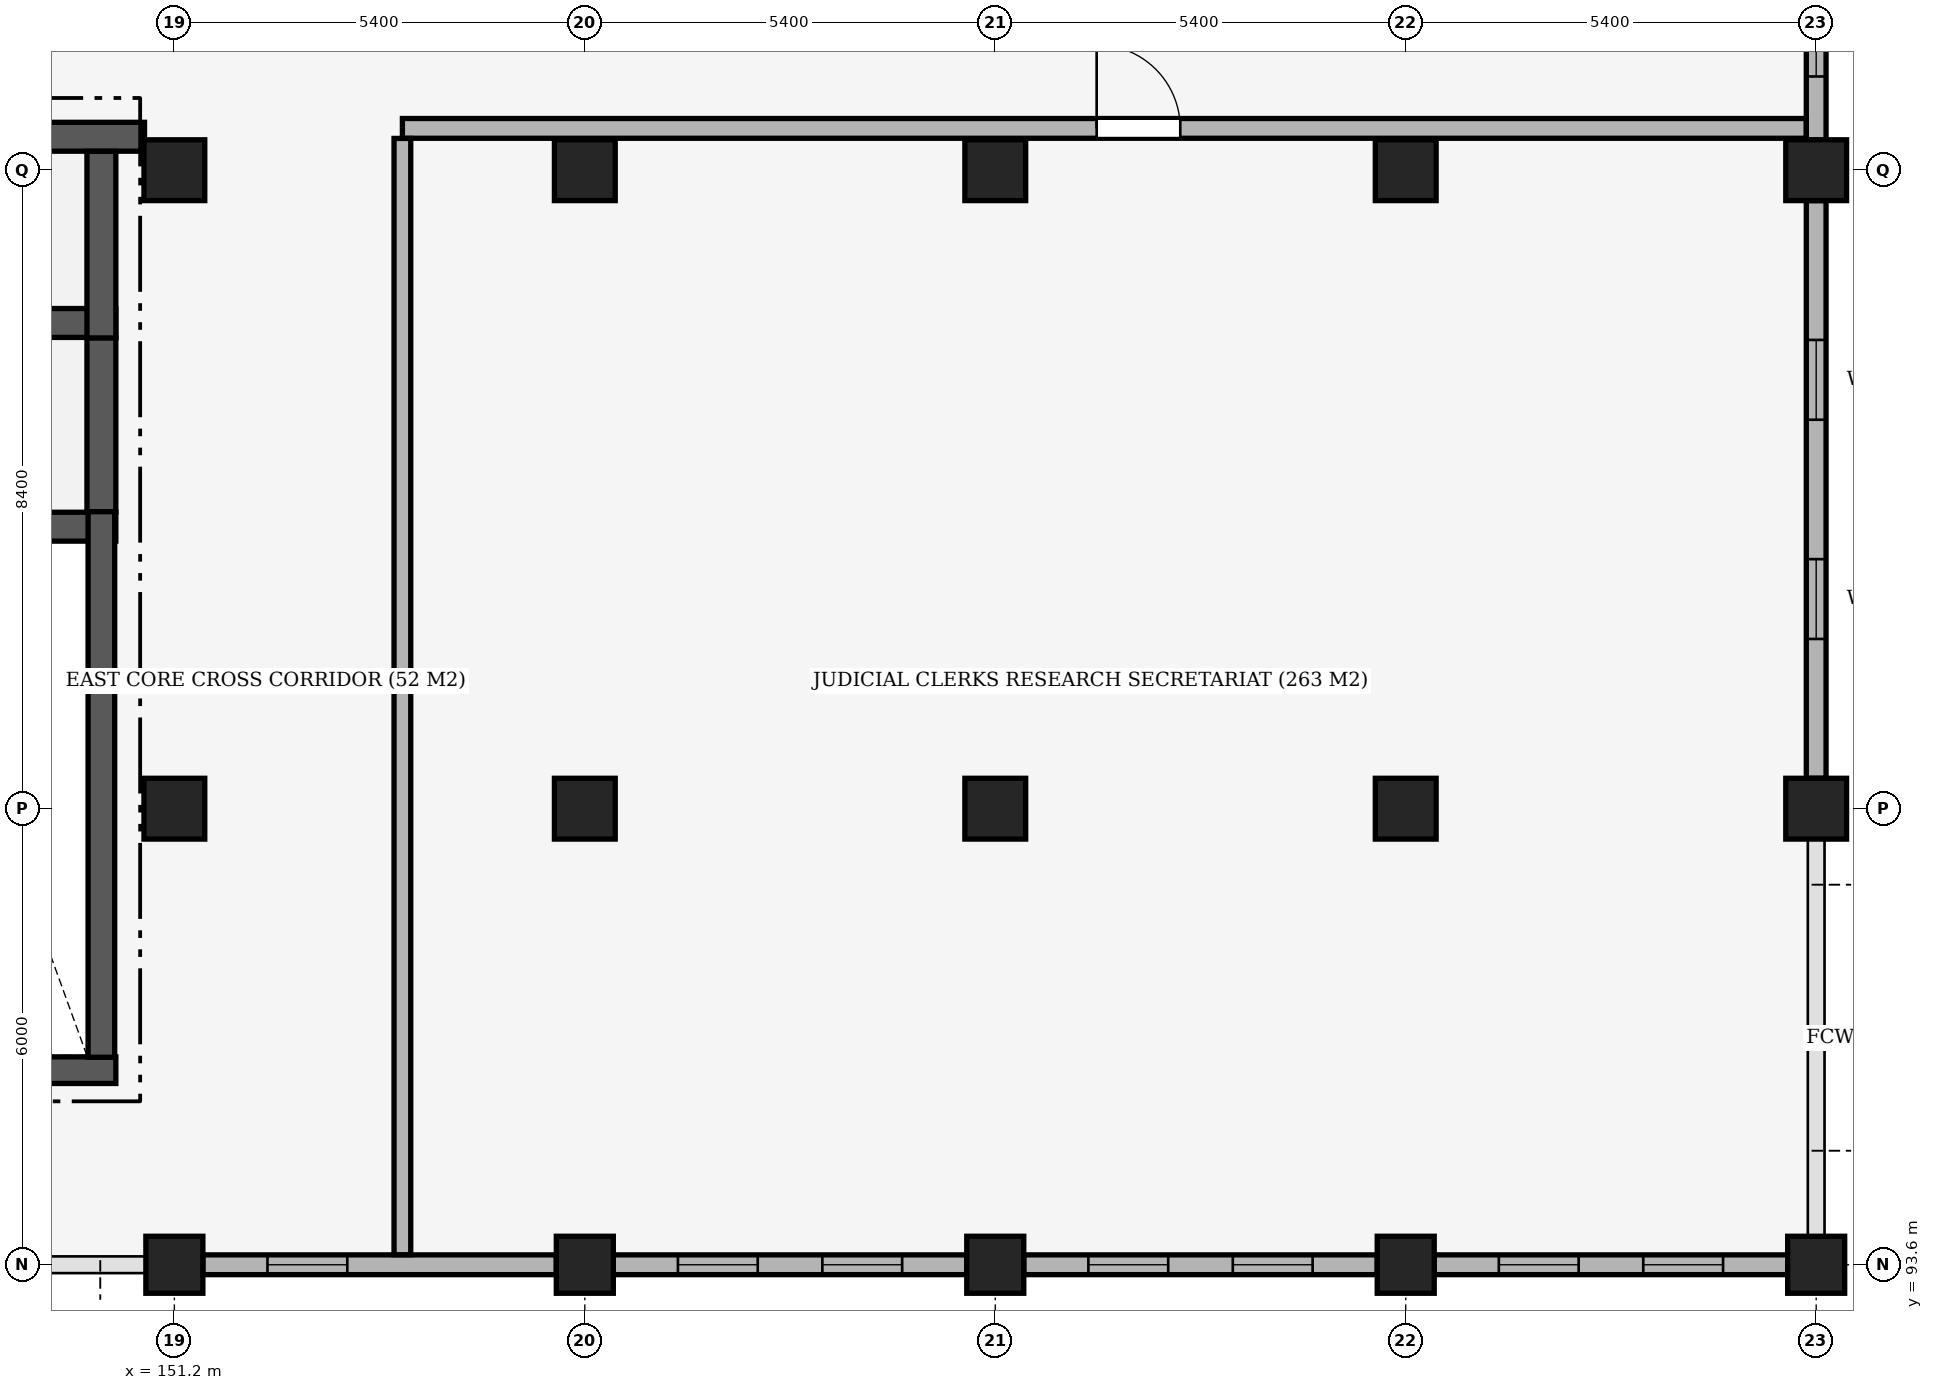
"""IFC4 building model, lengths in metres.
Left out: names, types, materials, properties, quantities, classifications, styles, units other than length and angle.
Written with IfcOpenShell. Run it as: python <this file> out.ifc"""

import sys

from ifc_helpers import new_model, si_unit, direction, frame, frame_2d, origin, origin_2d, place, context, subcontext, project, spatial, rectangle, extrude, element, fill, save


model = new_model("IFC4")
c1 = context("Model", 3, precision=1e-05, world=origin(), true_north=direction((0.0, 1.0)))
c2 = subcontext(c1, "Body", "Model", "MODEL_VIEW")
j1 = project(units=[si_unit("LENGTHUNIT", "METRE"), si_unit("PLANEANGLEUNIT", "RADIAN")], contexts=[c1])
p1 = place(None, origin())
s1 = spatial("IfcSite", under=j1, at=p1, CompositionType="ELEMENT")
p2 = place(p1, origin())
s2 = spatial("IfcBuilding", under=s1, at=p2, CompositionType="ELEMENT")
p3 = place(p2, frame((0.0, 0.0, 20.4)))
s3 = spatial("IfcBuildingStorey", under=s2, at=p3, CompositionType="ELEMENT", Elevation=20.4)
p4 = place(p3, frame((151.2, 93.6, 0.0), z_axis=(0.0, 0.0, 1.0), x_axis=(1.0, 0.0, 0.0)))
e1 = element("IfcColumn", 1, at=p4, inside=s3, PredefinedType="COLUMN", context=c2, shape_type="SweptSolid", body=[
    extrude(rectangle(XDim=0.75, YDim=0.75, at=origin_2d()), origin(), (0.0, 0.0, 1.0), 4.8),
])
for number, where, z_axis, x_axis in (
    (2, (151.2, 99.6, 0.0), (0.0, 0.0, 1.0), (1.0, 0.0, 0.0)),
    (3, (151.2, 108.0, 0.0), (0.0, 0.0, 1.0), (1.0, 0.0, 0.0)),
):
    element("IfcColumn", number, at=place(p3, frame(where, z_axis=z_axis, x_axis=x_axis)), inside=s3, PredefinedType="COLUMN", context=c2, shape_type="SweptSolid", body=[
        extrude(rectangle(XDim=0.8, YDim=0.8, at=origin_2d()), origin(), (0.0, 0.0, 1.0), 4.8),
    ])
p5 = place(p3, frame((156.6, 93.6, 0.0), z_axis=(0.0, 0.0, 1.0), x_axis=(1.0, 0.0, 0.0)))
e4 = element("IfcColumn", 4, at=p5, inside=s3, PredefinedType="COLUMN", context=c2, shape_type="SweptSolid", body=[
    extrude(rectangle(XDim=0.75, YDim=0.75, at=origin_2d()), origin(), (0.0, 0.0, 1.0), 4.8),
])
for number, where, z_axis, x_axis in (
    (5, (156.6, 99.6, 0.0), (0.0, 0.0, 1.0), (1.0, 0.0, 0.0)),
    (6, (156.6, 108.0, 0.0), (0.0, 0.0, 1.0), (1.0, 0.0, 0.0)),
):
    element("IfcColumn", number, at=place(p3, frame(where, z_axis=z_axis, x_axis=x_axis)), inside=s3, PredefinedType="COLUMN", context=c2, shape_type="SweptSolid", body=[
        extrude(rectangle(XDim=0.8, YDim=0.8, at=origin_2d()), origin(), (0.0, 0.0, 1.0), 4.8),
    ])
p6 = place(p3, frame((162.0, 93.6, 0.0), z_axis=(0.0, 0.0, 1.0), x_axis=(1.0, 0.0, 0.0)))
e7 = element("IfcColumn", 7, at=p6, inside=s3, PredefinedType="COLUMN", context=c2, shape_type="SweptSolid", body=[
    extrude(rectangle(XDim=0.75, YDim=0.75, at=origin_2d()), origin(), (0.0, 0.0, 1.0), 4.8),
])
for number, where, z_axis, x_axis in (
    (8, (162.0, 99.6, 0.0), (0.0, 0.0, 1.0), (1.0, 0.0, 0.0)),
    (9, (162.0, 108.0, 0.0), (0.0, 0.0, 1.0), (1.0, 0.0, 0.0)),
):
    element("IfcColumn", number, at=place(p3, frame(where, z_axis=z_axis, x_axis=x_axis)), inside=s3, PredefinedType="COLUMN", context=c2, shape_type="SweptSolid", body=[
        extrude(rectangle(XDim=0.8, YDim=0.8, at=origin_2d()), origin(), (0.0, 0.0, 1.0), 4.8),
    ])
p7 = place(p3, frame((167.4, 93.6, 0.0), z_axis=(0.0, 0.0, 1.0), x_axis=(1.0, 0.0, 0.0)))
e10 = element("IfcColumn", 10, at=p7, inside=s3, PredefinedType="COLUMN", context=c2, shape_type="SweptSolid", body=[
    extrude(rectangle(XDim=0.75, YDim=0.75, at=origin_2d()), origin(), (0.0, 0.0, 1.0), 4.8),
])
for number, where, z_axis, x_axis in (
    (11, (167.4, 99.6, 0.0), (0.0, 0.0, 1.0), (1.0, 0.0, 0.0)),
    (12, (167.4, 108.0, 0.0), (0.0, 0.0, 1.0), (1.0, 0.0, 0.0)),
):
    element("IfcColumn", number, at=place(p3, frame(where, z_axis=z_axis, x_axis=x_axis)), inside=s3, PredefinedType="COLUMN", context=c2, shape_type="SweptSolid", body=[
        extrude(rectangle(XDim=0.8, YDim=0.8, at=origin_2d()), origin(), (0.0, 0.0, 1.0), 4.8),
    ])
p8 = place(p3, frame((172.8, 93.6, 0.0), z_axis=(0.0, 0.0, 1.0), x_axis=(1.0, 0.0, 0.0)))
e13 = element("IfcColumn", 13, at=p8, inside=s3, PredefinedType="COLUMN", context=c2, shape_type="SweptSolid", body=[
    extrude(rectangle(XDim=0.75, YDim=0.75, at=origin_2d()), origin(), (0.0, 0.0, 1.0), 4.8),
])
for number, where, z_axis, x_axis in (
    (14, (172.8, 99.6, 0.0), (0.0, 0.0, 1.0), (1.0, 0.0, 0.0)),
    (15, (172.8, 108.0, 0.0), (0.0, 0.0, 1.0), (1.0, 0.0, 0.0)),
):
    element("IfcColumn", number, at=place(p3, frame(where, z_axis=z_axis, x_axis=x_axis)), inside=s3, PredefinedType="COLUMN", context=c2, shape_type="SweptSolid", body=[
        extrude(rectangle(XDim=0.8, YDim=0.8, at=origin_2d()), origin(), (0.0, 0.0, 1.0), 4.8),
    ])
p9 = place(p3, frame((172.8, 113.0, 0.0), z_axis=(0.0, 0.0, 1.0), x_axis=(0.0, -1.0, 0.0)))
e16 = element("IfcWall", 16, at=p9, inside=s3, PredefinedType="SOLIDWALL", context=c2, shape_type="SweptSolid", body=[
    extrude(rectangle(XDim=4.6, YDim=0.26, at=frame_2d((2.3, 0.0))), origin(), (0.0, 0.0, 1.0), 4.0),
])
p10 = place(p9, frame((0.833, 0.0, 1.05)))
e17 = element("IfcOpeningElement", 17, at=p10, cuts=e16, PredefinedType="OPENING", context=c2, shape_type="SweptSolid", body=[
    extrude(rectangle(XDim=1.05, YDim=1.8, at=frame_2d((0.525, 0.9))), frame((0.0, 0.145, 0.0), z_axis=(0.0, -1.0, 0.0), x_axis=(1.0, 0.0, 0.0)), (0.0, 0.0, 1.0), 0.29),
])
p11 = place(p9, frame((2.717, 0.0, 1.05)))
e18 = element("IfcOpeningElement", 18, at=p11, cuts=e16, PredefinedType="OPENING", context=c2, shape_type="SweptSolid", body=[
    extrude(rectangle(XDim=1.05, YDim=1.8, at=frame_2d((0.525, 0.9))), frame((0.0, 0.145, 0.0), z_axis=(0.0, -1.0, 0.0), x_axis=(1.0, 0.0, 0.0)), (0.0, 0.0, 1.0), 0.29),
])
p12 = place(p3, frame((172.8, 107.6, 0.0), z_axis=(0.0, 0.0, 1.0), x_axis=(0.0, -1.0, 0.0)))
e19 = element("IfcWall", 19, at=p12, inside=s3, PredefinedType="SOLIDWALL", context=c2, shape_type="SweptSolid", body=[
    extrude(rectangle(XDim=7.6, YDim=0.26, at=frame_2d((3.8, 0.0))), origin(), (0.0, 0.0, 1.0), 3.85),
])
p13 = place(p12, frame((1.833, 0.0, 1.05)))
e20 = element("IfcOpeningElement", 20, at=p13, cuts=e19, PredefinedType="OPENING", context=c2, shape_type="SweptSolid", body=[
    extrude(rectangle(XDim=1.05, YDim=1.8, at=frame_2d((0.525, 0.9))), frame((0.0, 0.145, 0.0), z_axis=(0.0, -1.0, 0.0), x_axis=(1.0, 0.0, 0.0)), (0.0, 0.0, 1.0), 0.29),
])
p14 = place(p12, frame((4.717, 0.0, 1.05)))
e21 = element("IfcOpeningElement", 21, at=p14, cuts=e19, PredefinedType="OPENING", context=c2, shape_type="SweptSolid", body=[
    extrude(rectangle(XDim=1.05, YDim=1.8, at=frame_2d((0.525, 0.9))), frame((0.0, 0.145, 0.0), z_axis=(0.0, -1.0, 0.0), x_axis=(1.0, 0.0, 0.0)), (0.0, 0.0, 1.0), 0.29),
])
p15 = place(p3, frame((172.425, 93.6, 0.0), z_axis=(0.0, 0.0, 1.0), x_axis=(-1.0, 0.0, 0.0)))
e22 = element("IfcWall", 22, at=p15, inside=s3, PredefinedType="SOLIDWALL", context=c2, shape_type="SweptSolid", body=[
    extrude(rectangle(XDim=4.65, YDim=0.26, at=frame_2d((2.325, 0.0))), origin(), (0.0, 0.0, 1.0), 3.95),
])
p16 = place(p15, frame((0.85, 0.0, 1.05)))
e23 = element("IfcOpeningElement", 23, at=p16, cuts=e22, PredefinedType="OPENING", context=c2, shape_type="SweptSolid", body=[
    extrude(rectangle(XDim=1.05, YDim=1.8, at=frame_2d((0.525, 0.9))), frame((0.0, 0.145, 0.0), z_axis=(0.0, -1.0, 0.0), x_axis=(1.0, 0.0, 0.0)), (0.0, 0.0, 1.0), 0.29),
])
p17 = place(p15, frame((2.75, 0.0, 1.05)))
e24 = element("IfcOpeningElement", 24, at=p17, cuts=e22, PredefinedType="OPENING", context=c2, shape_type="SweptSolid", body=[
    extrude(rectangle(XDim=1.05, YDim=1.8, at=frame_2d((0.525, 0.9))), frame((0.0, 0.145, 0.0), z_axis=(0.0, -1.0, 0.0), x_axis=(1.0, 0.0, 0.0)), (0.0, 0.0, 1.0), 0.29),
])
p18 = place(p3, frame((167.025, 93.6, 0.0), z_axis=(0.0, 0.0, 1.0), x_axis=(-1.0, 0.0, 0.0)))
e25 = element("IfcWall", 25, at=p18, inside=s3, PredefinedType="SOLIDWALL", context=c2, shape_type="SweptSolid", body=[
    extrude(rectangle(XDim=4.65, YDim=0.26, at=frame_2d((2.325, 0.0))), origin(), (0.0, 0.0, 1.0), 3.95),
])
p19 = place(p18, frame((0.85, 0.0, 1.05)))
e26 = element("IfcOpeningElement", 26, at=p19, cuts=e25, PredefinedType="OPENING", context=c2, shape_type="SweptSolid", body=[
    extrude(rectangle(XDim=1.05, YDim=1.8, at=frame_2d((0.525, 0.9))), frame((0.0, 0.145, 0.0), z_axis=(0.0, -1.0, 0.0), x_axis=(1.0, 0.0, 0.0)), (0.0, 0.0, 1.0), 0.29),
])
p20 = place(p18, frame((2.75, 0.0, 1.05)))
e27 = element("IfcOpeningElement", 27, at=p20, cuts=e25, PredefinedType="OPENING", context=c2, shape_type="SweptSolid", body=[
    extrude(rectangle(XDim=1.05, YDim=1.8, at=frame_2d((0.525, 0.9))), frame((0.0, 0.145, 0.0), z_axis=(0.0, -1.0, 0.0), x_axis=(1.0, 0.0, 0.0)), (0.0, 0.0, 1.0), 0.29),
])
p21 = place(p3, frame((161.625, 93.6, 0.0), z_axis=(0.0, 0.0, 1.0), x_axis=(-1.0, 0.0, 0.0)))
e28 = element("IfcWall", 28, at=p21, inside=s3, PredefinedType="SOLIDWALL", context=c2, shape_type="SweptSolid", body=[
    extrude(rectangle(XDim=4.65, YDim=0.26, at=frame_2d((2.325, 0.0))), origin(), (0.0, 0.0, 1.0), 3.95),
])
p22 = place(p21, frame((0.85, 0.0, 1.05)))
e29 = element("IfcOpeningElement", 29, at=p22, cuts=e28, PredefinedType="OPENING", context=c2, shape_type="SweptSolid", body=[
    extrude(rectangle(XDim=1.05, YDim=1.8, at=frame_2d((0.525, 0.9))), frame((0.0, 0.145, 0.0), z_axis=(0.0, -1.0, 0.0), x_axis=(1.0, 0.0, 0.0)), (0.0, 0.0, 1.0), 0.29),
])
p23 = place(p21, frame((2.75, 0.0, 1.05)))
e30 = element("IfcOpeningElement", 30, at=p23, cuts=e28, PredefinedType="OPENING", context=c2, shape_type="SweptSolid", body=[
    extrude(rectangle(XDim=1.05, YDim=1.8, at=frame_2d((0.525, 0.9))), frame((0.0, 0.145, 0.0), z_axis=(0.0, -1.0, 0.0), x_axis=(1.0, 0.0, 0.0)), (0.0, 0.0, 1.0), 0.29),
])
p24 = place(p3, frame((156.225, 93.6, 0.0), z_axis=(0.0, 0.0, 1.0), x_axis=(-1.0, 0.0, 0.0)))
e31 = element("IfcWall", 31, at=p24, inside=s3, PredefinedType="SOLIDWALL", context=c2, shape_type="SweptSolid", body=[
    extrude(rectangle(XDim=4.65, YDim=0.26, at=frame_2d((2.325, 0.0))), origin(), (0.0, 0.0, 1.0), 3.95),
])
p25 = place(p24, frame((2.75, 0.0, 1.05)))
e32 = element("IfcOpeningElement", 32, at=p25, cuts=e31, PredefinedType="OPENING", context=c2, shape_type="SweptSolid", body=[
    extrude(rectangle(XDim=1.05, YDim=1.8, at=frame_2d((0.525, 0.9))), frame((0.0, 0.145, 0.0), z_axis=(0.0, -1.0, 0.0), x_axis=(1.0, 0.0, 0.0)), (0.0, 0.0, 1.0), 0.29),
])
p26 = place(p3, frame((147.513, 103.31, 0.0), z_axis=(0.0, 0.0, 1.0), x_axis=(1.0, 0.0, 0.0)))
e33 = element("IfcWall", 33, at=p26, inside=s3, PredefinedType="SHEAR", context=c2, shape_type="SweptSolid", body=[
    extrude(rectangle(XDim=2.917, YDim=0.38, at=frame_2d((1.458, 0.0))), origin(), (0.0, 0.0, 1.0), 4.55),
])
p27 = place(p3, frame((147.17, 105.99, 0.0), z_axis=(0.0, 0.0, 1.0), x_axis=(1.0, 0.0, 0.0)))
e34 = element("IfcWall", 34, at=p27, inside=s3, PredefinedType="SHEAR", context=c2, shape_type="SweptSolid", body=[
    extrude(rectangle(XDim=3.26, YDim=0.38, at=frame_2d((1.63, 0.0))), origin(), (0.0, 0.0, 1.0), 4.55),
])
p28 = place(p3, frame((150.24, 103.502, 0.0), z_axis=(0.0, 0.0, 1.0), x_axis=(0.0, 1.0, 0.0)))
e35 = element("IfcWall", 35, at=p28, inside=s3, PredefinedType="SHEAR", context=c2, shape_type="SweptSolid", body=[
    extrude(rectangle(XDim=2.296, YDim=0.38, at=frame_2d((1.148, 0.0))), origin(), (0.0, 0.0, 1.0), 4.55),
])
p29 = place(p3, frame((147.17, 108.44, 0.0), z_axis=(0.0, 0.0, 1.0), x_axis=(1.0, 0.0, 0.0)))
e36 = element("IfcWall", 36, at=p29, inside=s3, PredefinedType="SHEAR", context=c2, shape_type="SweptSolid", body=[
    extrude(rectangle(XDim=3.637, YDim=0.38, at=frame_2d((1.818, 0.0))), origin(), (0.0, 0.0, 1.0), 4.55),
])
p30 = place(p3, frame((150.24, 105.793, 0.0), z_axis=(0.0, 0.0, 1.0), x_axis=(0.0, 1.0, 0.0)))
e37 = element("IfcWall", 37, at=p30, inside=s3, PredefinedType="SHEAR", context=c2, shape_type="SweptSolid", body=[
    extrude(rectangle(XDim=2.455, YDim=0.38, at=frame_2d((1.228, 0.0))), origin(), (0.0, 0.0, 1.0), 4.55),
])
p31 = place(p3, frame((147.58, 96.16, 0.0), z_axis=(0.0, 0.0, 1.0), x_axis=(1.0, 0.0, 0.0)))
e38 = element("IfcWall", 38, at=p31, inside=s3, PredefinedType="SHEAR", context=c2, shape_type="SweptSolid", body=[
    extrude(rectangle(XDim=2.85, YDim=0.35, at=frame_2d((1.425, 0.0))), origin(), (0.0, 0.0, 1.0), 4.55),
])
p32 = place(p3, frame((150.24, 96.33, 0.0), z_axis=(0.0, 0.0, 1.0), x_axis=(0.0, 1.0, 0.0)))
e39 = element("IfcWall", 39, at=p32, inside=s3, PredefinedType="SHEAR", context=c2, shape_type="SweptSolid", body=[
    extrude(rectangle(XDim=7.177, YDim=0.35, at=frame_2d((3.588, 0.0))), origin(), (0.0, 0.0, 1.0), 4.55),
])
p33 = place(p3, frame((154.2, 108.55, 0.0), z_axis=(0.0, 0.0, 1.0), x_axis=(1.0, 0.0, 0.0)))
e40 = element("IfcWall", 40, at=p33, inside=s3, PredefinedType="PARTITIONING", context=c2, shape_type="SweptSolid", body=[
    extrude(rectangle(XDim=18.468, YDim=0.26, at=frame_2d((9.234, 0.0))), origin(), (0.0, 0.0, 1.0), 4.0),
])
p34 = place(p33, frame((9.134, 0.0, 0.0)))
e41 = element("IfcOpeningElement", 41, at=p34, cuts=e40, PredefinedType="OPENING", context=c2, shape_type="SweptSolid", body=[
    extrude(rectangle(XDim=1.1, YDim=2.1, at=frame_2d((0.55, 1.05))), frame((0.0, 0.145, 0.0), z_axis=(0.0, -1.0, 0.0), x_axis=(1.0, 0.0, 0.0)), (0.0, 0.0, 1.0), 0.29),
])
p35 = place(p3, frame((154.2, 93.732, 0.0), z_axis=(0.0, 0.0, 1.0), x_axis=(0.0, 1.0, 0.0)))
e42 = element("IfcWall", 42, at=p35, inside=s3, PredefinedType="PARTITIONING", context=c2, shape_type="SweptSolid", body=[
    extrude(rectangle(XDim=14.686, YDim=0.22, at=frame_2d((7.343, 0.0))), origin(), (0.0, 0.0, 1.0), 3.95),
])
p36 = place(p11, origin())
e43 = element("IfcWindow", 43, at=p36, inside=s3, PartitioningType="SINGLE_PANEL", PredefinedType="WINDOW", context=c2, shape_type="SweptSolid", body=[
    extrude(rectangle(XDim=1.05, YDim=1.8, at=frame_2d((0.525, 0.9))), frame((0.0, 0.03, 0.0), z_axis=(0.0, -1.0, 0.0), x_axis=(1.0, 0.0, 0.0)), (0.0, 0.0, 1.0), 0.06),
])
fill(e18, e43)
p37 = place(p13, origin())
e44 = element("IfcWindow", 44, at=p37, inside=s3, PartitioningType="SINGLE_PANEL", PredefinedType="WINDOW", context=c2, shape_type="SweptSolid", body=[
    extrude(rectangle(XDim=1.05, YDim=1.8, at=frame_2d((0.525, 0.9))), frame((0.0, 0.03, 0.0), z_axis=(0.0, -1.0, 0.0), x_axis=(1.0, 0.0, 0.0)), (0.0, 0.0, 1.0), 0.06),
])
fill(e20, e44)
p38 = place(p14, origin())
e45 = element("IfcWindow", 45, at=p38, inside=s3, PartitioningType="SINGLE_PANEL", PredefinedType="WINDOW", context=c2, shape_type="SweptSolid", body=[
    extrude(rectangle(XDim=1.05, YDim=1.8, at=frame_2d((0.525, 0.9))), frame((0.0, 0.03, 0.0), z_axis=(0.0, -1.0, 0.0), x_axis=(1.0, 0.0, 0.0)), (0.0, 0.0, 1.0), 0.06),
])
fill(e21, e45)
p39 = place(p16, origin())
e46 = element("IfcWindow", 46, at=p39, inside=s3, PartitioningType="SINGLE_PANEL", PredefinedType="WINDOW", context=c2, shape_type="SweptSolid", body=[
    extrude(rectangle(XDim=1.05, YDim=1.8, at=frame_2d((0.525, 0.9))), frame((0.0, 0.03, 0.0), z_axis=(0.0, -1.0, 0.0), x_axis=(1.0, 0.0, 0.0)), (0.0, 0.0, 1.0), 0.06),
])
fill(e23, e46)
p40 = place(p17, origin())
e47 = element("IfcWindow", 47, at=p40, inside=s3, PartitioningType="SINGLE_PANEL", PredefinedType="WINDOW", context=c2, shape_type="SweptSolid", body=[
    extrude(rectangle(XDim=1.05, YDim=1.8, at=frame_2d((0.525, 0.9))), frame((0.0, 0.03, 0.0), z_axis=(0.0, -1.0, 0.0), x_axis=(1.0, 0.0, 0.0)), (0.0, 0.0, 1.0), 0.06),
])
fill(e24, e47)
p41 = place(p19, origin())
e48 = element("IfcWindow", 48, at=p41, inside=s3, PartitioningType="SINGLE_PANEL", PredefinedType="WINDOW", context=c2, shape_type="SweptSolid", body=[
    extrude(rectangle(XDim=1.05, YDim=1.8, at=frame_2d((0.525, 0.9))), frame((0.0, 0.03, 0.0), z_axis=(0.0, -1.0, 0.0), x_axis=(1.0, 0.0, 0.0)), (0.0, 0.0, 1.0), 0.06),
])
fill(e26, e48)
p42 = place(p20, origin())
e49 = element("IfcWindow", 49, at=p42, inside=s3, PartitioningType="SINGLE_PANEL", PredefinedType="WINDOW", context=c2, shape_type="SweptSolid", body=[
    extrude(rectangle(XDim=1.05, YDim=1.8, at=frame_2d((0.525, 0.9))), frame((0.0, 0.03, 0.0), z_axis=(0.0, -1.0, 0.0), x_axis=(1.0, 0.0, 0.0)), (0.0, 0.0, 1.0), 0.06),
])
fill(e27, e49)
p43 = place(p22, origin())
e50 = element("IfcWindow", 50, at=p43, inside=s3, PartitioningType="SINGLE_PANEL", PredefinedType="WINDOW", context=c2, shape_type="SweptSolid", body=[
    extrude(rectangle(XDim=1.05, YDim=1.8, at=frame_2d((0.525, 0.9))), frame((0.0, 0.03, 0.0), z_axis=(0.0, -1.0, 0.0), x_axis=(1.0, 0.0, 0.0)), (0.0, 0.0, 1.0), 0.06),
])
fill(e29, e50)
p44 = place(p23, origin())
e51 = element("IfcWindow", 51, at=p44, inside=s3, PartitioningType="SINGLE_PANEL", PredefinedType="WINDOW", context=c2, shape_type="SweptSolid", body=[
    extrude(rectangle(XDim=1.05, YDim=1.8, at=frame_2d((0.525, 0.9))), frame((0.0, 0.03, 0.0), z_axis=(0.0, -1.0, 0.0), x_axis=(1.0, 0.0, 0.0)), (0.0, 0.0, 1.0), 0.06),
])
fill(e30, e51)
p45 = place(p25, origin())
e52 = element("IfcWindow", 52, at=p45, inside=s3, PartitioningType="SINGLE_PANEL", PredefinedType="WINDOW", context=c2, shape_type="SweptSolid", body=[
    extrude(rectangle(XDim=1.05, YDim=1.8, at=frame_2d((0.525, 0.9))), frame((0.0, 0.03, 0.0), z_axis=(0.0, -1.0, 0.0), x_axis=(1.0, 0.0, 0.0)), (0.0, 0.0, 1.0), 0.06),
])
fill(e32, e52)
p46 = place(p34, origin())
e53 = element("IfcDoor", 53, at=p46, inside=s3, OperationType="SINGLE_SWING_LEFT", PredefinedType="DOOR", context=c2, shape_type="SweptSolid", body=[
    extrude(rectangle(XDim=1.1, YDim=2.1, at=frame_2d((0.55, 1.05))), frame((0.0, 0.025, 0.0), z_axis=(0.0, -1.0, 0.0), x_axis=(1.0, 0.0, 0.0)), (0.0, 0.0, 1.0), 0.05),
])
fill(e41, e53)
save(model, sys.argv[1])
